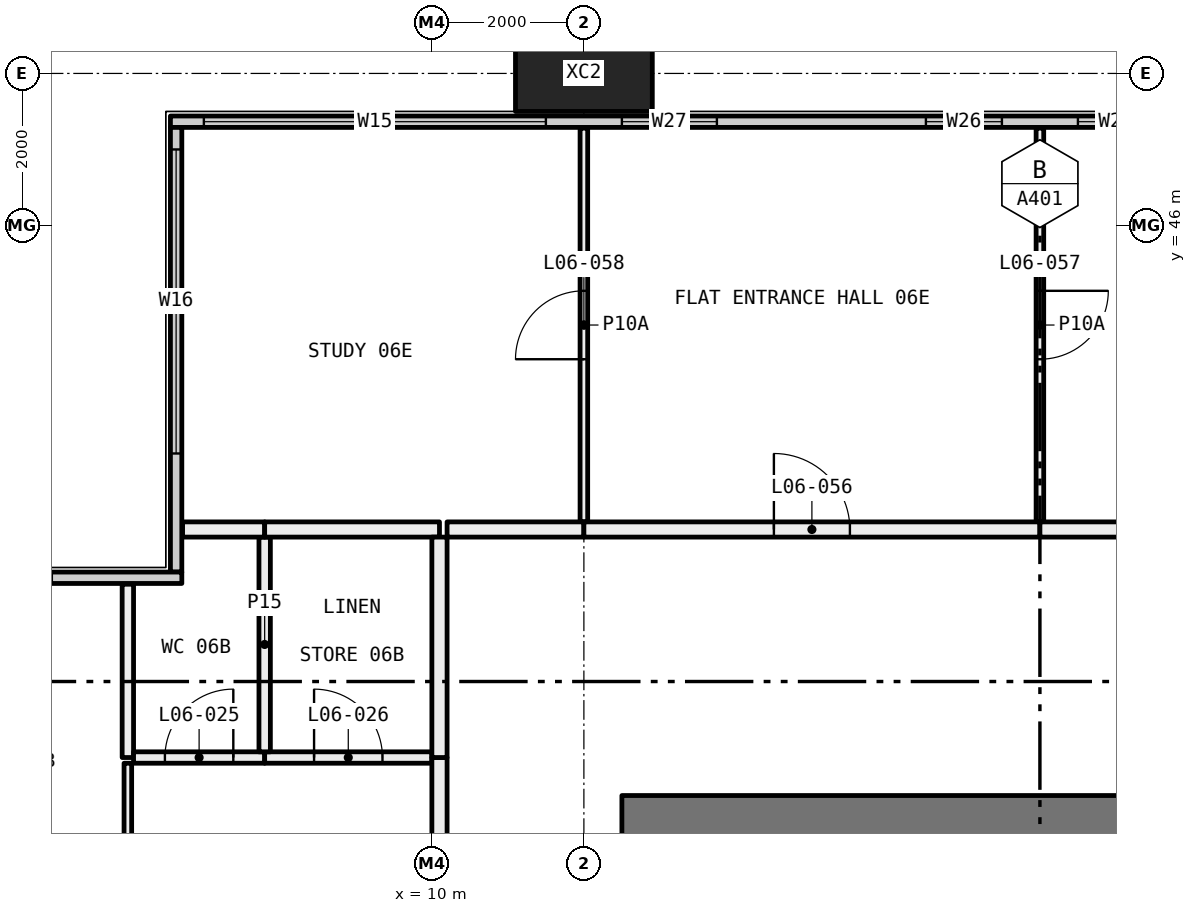
"""IFC4 building model, lengths in metres.
Left out: names, types, materials, properties, quantities, classifications, styles, units other than length and angle.
Written with IfcOpenShell. Run it as: python <this file> out.ifc"""

import sys

from ifc_helpers import new_model, si_unit, direction, frame, frame_2d, origin, origin_2d, place, context, subcontext, project, spatial, rectangle, hollow_rectangle, extrude, element, fill, save


model = new_model("IFC4")
c1 = context("Model", 3, precision=1e-05, world=origin(), true_north=direction((0.0, 1.0)))
c2 = subcontext(c1, "Body", "Model", "MODEL_VIEW")
j1 = project(units=[si_unit("LENGTHUNIT", "METRE"), si_unit("PLANEANGLEUNIT", "RADIAN")], contexts=[c1])
p1 = place(None, origin())
s1 = spatial("IfcSite", under=j1, at=p1, CompositionType="ELEMENT")
p2 = place(p1, origin())
s2 = spatial("IfcBuilding", under=s1, at=p2, CompositionType="ELEMENT")
p3 = place(p2, frame((0.0, 0.0, 33.45)))
s3 = spatial("IfcBuildingStorey", under=s2, at=p3, CompositionType="ELEMENT", Elevation=33.45)
p4 = place(p3, frame((12.0, 48.0, -0.4), z_axis=(0.0, 0.0, 1.0), x_axis=(1.0, 0.0, 0.0)))
e1 = element("IfcColumn", 1, at=p4, inside=s3, PredefinedType="COLUMN", context=c2, shape_type="SweptSolid", body=[
    extrude(hollow_rectangle(XDim=1.8, YDim=1.0, WallThickness=0.07, at=origin_2d()), origin(), (0.0, 0.0, 1.0), 3.45),
])
p5 = place(p3, frame((6.56, 47.365, 0.0), z_axis=(0.0, 0.0, 1.0), x_axis=(1.0, 0.0, 0.0)))
e2 = element("IfcWall", 2, at=p5, inside=s3, PredefinedType="ELEMENTEDWALL", context=c2, shape_type="SweptSolid", body=[
    extrude(rectangle(XDim=58.88, YDim=0.15, at=frame_2d((29.44, 0.0))), origin(), (0.0, 0.0, 1.0), 3.05),
])
p6 = place(p5, frame((0.44, 0.0, 0.45)))
e3 = element("IfcOpeningElement", 3, at=p6, cuts=e2, PredefinedType="OPENING", context=c2, shape_type="SweptSolid", body=[
    extrude(rectangle(XDim=4.5, YDim=2.55, at=frame_2d((2.25, 1.275))), frame((0.0, 0.085, 0.0), z_axis=(0.0, -1.0, 0.0), x_axis=(1.0, 0.0, 0.0)), (0.0, 0.0, 1.0), 0.17),
])
p7 = place(p5, frame((5.94, 0.0, 0.45)))
e4 = element("IfcOpeningElement", 4, at=p7, cuts=e2, PredefinedType="OPENING", context=c2, shape_type="SweptSolid", body=[
    extrude(rectangle(XDim=1.25, YDim=2.55, at=frame_2d((0.625, 1.275))), frame((0.0, 0.085, 0.0), z_axis=(0.0, -1.0, 0.0), x_axis=(1.0, 0.0, 0.0)), (0.0, 0.0, 1.0), 0.17),
])
p8 = place(p5, frame((9.94, 0.0, 0.45)))
e5 = element("IfcOpeningElement", 5, at=p8, cuts=e2, PredefinedType="OPENING", context=c2, shape_type="SweptSolid", body=[
    extrude(rectangle(XDim=1.0, YDim=2.55, at=frame_2d((0.5, 1.275))), frame((0.0, 0.085, 0.0), z_axis=(0.0, -1.0, 0.0), x_axis=(1.0, 0.0, 0.0)), (0.0, 0.0, 1.0), 0.17),
])
p9 = place(p5, frame((11.94, 0.0, 0.45)))
e6 = element("IfcOpeningElement", 6, at=p9, cuts=e2, PredefinedType="OPENING", context=c2, shape_type="SweptSolid", body=[
    extrude(rectangle(XDim=1.0, YDim=2.55, at=frame_2d((0.5, 1.275))), frame((0.0, 0.085, 0.0), z_axis=(0.0, -1.0, 0.0), x_axis=(1.0, 0.0, 0.0)), (0.0, 0.0, 1.0), 0.17),
])
p10 = place(p5, frame((15.69, 0.0, 0.45)))
e7 = element("IfcOpeningElement", 7, at=p10, cuts=e2, PredefinedType="OPENING", context=c2, shape_type="SweptSolid", body=[
    extrude(rectangle(XDim=1.25, YDim=2.55, at=frame_2d((0.625, 1.275))), frame((0.0, 0.085, 0.0), z_axis=(0.0, -1.0, 0.0), x_axis=(1.0, 0.0, 0.0)), (0.0, 0.0, 1.0), 0.17),
])
p11 = place(p5, frame((17.94, 0.0, 0.45)))
e8 = element("IfcOpeningElement", 8, at=p11, cuts=e2, PredefinedType="OPENING", context=c2, shape_type="SweptSolid", body=[
    extrude(rectangle(XDim=1.25, YDim=2.55, at=frame_2d((0.625, 1.275))), frame((0.0, 0.085, 0.0), z_axis=(0.0, -1.0, 0.0), x_axis=(1.0, 0.0, 0.0)), (0.0, 0.0, 1.0), 0.17),
])
p12 = place(p5, frame((21.94, 0.0, 0.45)))
e9 = element("IfcOpeningElement", 9, at=p12, cuts=e2, PredefinedType="OPENING", context=c2, shape_type="SweptSolid", body=[
    extrude(rectangle(XDim=1.0, YDim=2.55, at=frame_2d((0.5, 1.275))), frame((0.0, 0.085, 0.0), z_axis=(0.0, -1.0, 0.0), x_axis=(1.0, 0.0, 0.0)), (0.0, 0.0, 1.0), 0.17),
])
p13 = place(p5, frame((23.94, 0.0, 0.45)))
e10 = element("IfcOpeningElement", 10, at=p13, cuts=e2, PredefinedType="OPENING", context=c2, shape_type="SweptSolid", body=[
    extrude(rectangle(XDim=1.0, YDim=2.55, at=frame_2d((0.5, 1.275))), frame((0.0, 0.085, 0.0), z_axis=(0.0, -1.0, 0.0), x_axis=(1.0, 0.0, 0.0)), (0.0, 0.0, 1.0), 0.17),
])
p14 = place(p5, frame((27.69, 0.0, 0.45)))
e11 = element("IfcOpeningElement", 11, at=p14, cuts=e2, PredefinedType="OPENING", context=c2, shape_type="SweptSolid", body=[
    extrude(rectangle(XDim=1.25, YDim=2.55, at=frame_2d((0.625, 1.275))), frame((0.0, 0.085, 0.0), z_axis=(0.0, -1.0, 0.0), x_axis=(1.0, 0.0, 0.0)), (0.0, 0.0, 1.0), 0.17),
])
p15 = place(p5, frame((29.94, 0.0, 0.45)))
e12 = element("IfcOpeningElement", 12, at=p15, cuts=e2, PredefinedType="OPENING", context=c2, shape_type="SweptSolid", body=[
    extrude(rectangle(XDim=1.25, YDim=2.55, at=frame_2d((0.625, 1.275))), frame((0.0, 0.085, 0.0), z_axis=(0.0, -1.0, 0.0), x_axis=(1.0, 0.0, 0.0)), (0.0, 0.0, 1.0), 0.17),
])
p16 = place(p5, frame((33.94, 0.0, 0.45)))
e13 = element("IfcOpeningElement", 13, at=p16, cuts=e2, PredefinedType="OPENING", context=c2, shape_type="SweptSolid", body=[
    extrude(rectangle(XDim=1.0, YDim=2.55, at=frame_2d((0.5, 1.275))), frame((0.0, 0.085, 0.0), z_axis=(0.0, -1.0, 0.0), x_axis=(1.0, 0.0, 0.0)), (0.0, 0.0, 1.0), 0.17),
])
p17 = place(p5, frame((35.94, 0.0, 0.45)))
e14 = element("IfcOpeningElement", 14, at=p17, cuts=e2, PredefinedType="OPENING", context=c2, shape_type="SweptSolid", body=[
    extrude(rectangle(XDim=1.0, YDim=2.55, at=frame_2d((0.5, 1.275))), frame((0.0, 0.085, 0.0), z_axis=(0.0, -1.0, 0.0), x_axis=(1.0, 0.0, 0.0)), (0.0, 0.0, 1.0), 0.17),
])
p18 = place(p5, frame((39.69, 0.0, 0.45)))
e15 = element("IfcOpeningElement", 15, at=p18, cuts=e2, PredefinedType="OPENING", context=c2, shape_type="SweptSolid", body=[
    extrude(rectangle(XDim=1.25, YDim=2.55, at=frame_2d((0.625, 1.275))), frame((0.0, 0.085, 0.0), z_axis=(0.0, -1.0, 0.0), x_axis=(1.0, 0.0, 0.0)), (0.0, 0.0, 1.0), 0.17),
])
p19 = place(p5, frame((41.94, 0.0, 0.45)))
e16 = element("IfcOpeningElement", 16, at=p19, cuts=e2, PredefinedType="OPENING", context=c2, shape_type="SweptSolid", body=[
    extrude(rectangle(XDim=1.25, YDim=2.55, at=frame_2d((0.625, 1.275))), frame((0.0, 0.085, 0.0), z_axis=(0.0, -1.0, 0.0), x_axis=(1.0, 0.0, 0.0)), (0.0, 0.0, 1.0), 0.17),
])
p20 = place(p5, frame((45.94, 0.0, 0.45)))
e17 = element("IfcOpeningElement", 17, at=p20, cuts=e2, PredefinedType="OPENING", context=c2, shape_type="SweptSolid", body=[
    extrude(rectangle(XDim=1.0, YDim=2.55, at=frame_2d((0.5, 1.275))), frame((0.0, 0.085, 0.0), z_axis=(0.0, -1.0, 0.0), x_axis=(1.0, 0.0, 0.0)), (0.0, 0.0, 1.0), 0.17),
])
p21 = place(p5, frame((47.94, 0.0, 0.45)))
e18 = element("IfcOpeningElement", 18, at=p21, cuts=e2, PredefinedType="OPENING", context=c2, shape_type="SweptSolid", body=[
    extrude(rectangle(XDim=1.0, YDim=2.55, at=frame_2d((0.5, 1.275))), frame((0.0, 0.085, 0.0), z_axis=(0.0, -1.0, 0.0), x_axis=(1.0, 0.0, 0.0)), (0.0, 0.0, 1.0), 0.17),
])
p22 = place(p5, frame((51.69, 0.0, 0.45)))
e19 = element("IfcOpeningElement", 19, at=p22, cuts=e2, PredefinedType="OPENING", context=c2, shape_type="SweptSolid", body=[
    extrude(rectangle(XDim=1.25, YDim=2.55, at=frame_2d((0.625, 1.275))), frame((0.0, 0.085, 0.0), z_axis=(0.0, -1.0, 0.0), x_axis=(1.0, 0.0, 0.0)), (0.0, 0.0, 1.0), 0.17),
])
p23 = place(p5, frame((53.94, 0.0, 0.45)))
e20 = element("IfcOpeningElement", 20, at=p23, cuts=e2, PredefinedType="OPENING", context=c2, shape_type="SweptSolid", body=[
    extrude(rectangle(XDim=4.5, YDim=2.55, at=frame_2d((2.25, 1.275))), frame((0.0, 0.085, 0.0), z_axis=(0.0, -1.0, 0.0), x_axis=(1.0, 0.0, 0.0)), (0.0, 0.0, 1.0), 0.17),
])
p24 = place(p3, frame((6.635, 41.44, 0.0), z_axis=(0.0, 0.0, 1.0), x_axis=(0.0, 1.0, 0.0)))
e21 = element("IfcWall", 21, at=p24, inside=s3, PredefinedType="ELEMENTEDWALL", context=c2, shape_type="SweptSolid", body=[
    extrude(rectangle(XDim=5.85, YDim=0.15, at=frame_2d((2.925, 0.0))), origin(), (0.0, 0.0, 1.0), 3.05),
])
p25 = place(p24, frame((1.56, 0.0, 0.45)))
e22 = element("IfcOpeningElement", 22, at=p25, cuts=e21, PredefinedType="OPENING", context=c2, shape_type="SweptSolid", body=[
    extrude(rectangle(XDim=4.0, YDim=2.55, at=frame_2d((2.0, 1.275))), frame((0.0, 0.085, 0.0), z_axis=(0.0, -1.0, 0.0), x_axis=(1.0, 0.0, 0.0)), (0.0, 0.0, 1.0), 0.17),
])
p26 = place(p3, frame((0.56, 41.365, 0.0), z_axis=(0.0, 0.0, 1.0), x_axis=(1.0, 0.0, 0.0)))
e23 = element("IfcWall", 23, at=p26, inside=s3, PredefinedType="ELEMENTEDWALL", context=c2, shape_type="SweptSolid", body=[
    extrude(rectangle(XDim=6.15, YDim=0.15, at=frame_2d((3.075, 0.0))), origin(), (0.0, 0.0, 1.0), 3.05),
])
p27 = place(p26, frame((0.44, 0.0, 0.45)))
e24 = element("IfcOpeningElement", 24, at=p27, cuts=e23, PredefinedType="OPENING", context=c2, shape_type="SweptSolid", body=[
    extrude(rectangle(XDim=4.0, YDim=2.55, at=frame_2d((2.0, 1.275))), frame((0.0, 0.085, 0.0), z_axis=(0.0, -1.0, 0.0), x_axis=(1.0, 0.0, 0.0)), (0.0, 0.0, 1.0), 0.17),
])
p28 = place(p3, frame((6.0, 36.05, 0.0), z_axis=(0.0, 0.0, 1.0), x_axis=(0.0, 1.0, 0.0)))
e25 = element("IfcWall", 25, at=p28, inside=s3, PredefinedType="PARTITIONING", context=c2, shape_type="SweptSolid", body=[
    extrude(rectangle(XDim=2.875, YDim=0.1, at=frame_2d((1.438, 0.0))), origin(), (0.0, 0.0, 1.0), 2.45),
])
p29 = place(p3, frame((6.0, 39.0, 0.0), z_axis=(0.0, 0.0, 1.0), x_axis=(0.0, 1.0, 0.0)))
e26 = element("IfcWall", 26, at=p29, inside=s3, PredefinedType="PARTITIONING", context=c2, shape_type="SweptSolid", body=[
    extrude(rectangle(XDim=2.28, YDim=0.15, at=frame_2d((1.14, 0.0))), origin(), (0.0, 0.0, 1.0), 3.05),
])
p30 = place(p3, frame((7.8, 39.0, 0.0), z_axis=(0.0, 0.0, 1.0), x_axis=(-1.0, 0.0, 0.0)))
e27 = element("IfcWall", 27, at=p30, inside=s3, PredefinedType="PARTITIONING", context=c2, shape_type="SweptSolid", body=[
    extrude(rectangle(XDim=1.725, YDim=0.15, at=frame_2d((0.863, 0.0))), origin(), (0.0, 0.0, 1.0), 3.05),
])
p31 = place(p30, frame((0.413, 0.0, 0.0)))
e28 = element("IfcOpeningElement", 28, at=p31, cuts=e27, PredefinedType="OPENING", context=c2, shape_type="SweptSolid", body=[
    extrude(rectangle(XDim=0.9, YDim=2.1, at=frame_2d((0.45, 1.05))), frame((0.0, 0.085, 0.0), z_axis=(0.0, -1.0, 0.0), x_axis=(1.0, 0.0, 0.0)), (0.0, 0.0, 1.0), 0.17),
])
p32 = place(p3, frame((10.0, 39.0, 0.0), z_axis=(0.0, 0.0, 1.0), x_axis=(-1.0, 0.0, 0.0)))
e29 = element("IfcWall", 29, at=p32, inside=s3, PredefinedType="PARTITIONING", context=c2, shape_type="SweptSolid", body=[
    extrude(rectangle(XDim=2.2, YDim=0.15, at=frame_2d((1.1, 0.0))), origin(), (0.0, 0.0, 1.0), 3.05),
])
p33 = place(p32, frame((0.65, 0.0, 0.0)))
e30 = element("IfcOpeningElement", 30, at=p33, cuts=e29, PredefinedType="OPENING", context=c2, shape_type="SweptSolid", body=[
    extrude(rectangle(XDim=0.9, YDim=2.1, at=frame_2d((0.45, 1.05))), frame((0.0, 0.085, 0.0), z_axis=(0.0, -1.0, 0.0), x_axis=(1.0, 0.0, 0.0)), (0.0, 0.0, 1.0), 0.17),
])
p34 = place(p3, frame((10.1, 36.1, 0.0), z_axis=(0.0, 0.0, 1.0), x_axis=(0.0, 1.0, 0.0)))
e31 = element("IfcWall", 31, at=p34, inside=s3, PredefinedType="PARTITIONING", context=c2, shape_type="SweptSolid", body=[
    extrude(rectangle(XDim=2.9, YDim=0.2, at=frame_2d((1.45, 0.0))), origin(), (0.0, 0.0, 1.0), 3.05),
])
p35 = place(p3, frame((7.8, 39.075, 0.0), z_axis=(0.0, 0.0, 1.0), x_axis=(0.0, 1.0, 0.0)))
e32 = element("IfcWall", 32, at=p35, inside=s3, PredefinedType="PARTITIONING", context=c2, shape_type="SweptSolid", body=[
    extrude(rectangle(XDim=2.825, YDim=0.15, at=frame_2d((1.413, 0.0))), origin(), (0.0, 0.0, 1.0), 3.05),
])
p36 = place(p3, frame((7.8, 42.0, 0.0), z_axis=(0.0, 0.0, 1.0), x_axis=(-1.0, 0.0, 0.0)))
e33 = element("IfcWall", 33, at=p36, inside=s3, PredefinedType="PARTITIONING", context=c2, shape_type="SweptSolid", body=[
    extrude(rectangle(XDim=1.08, YDim=0.2, at=frame_2d((0.54, 0.0))), origin(), (0.0, 0.0, 1.0), 3.05),
])
p37 = place(p3, frame((10.1, 42.0, 0.0), z_axis=(0.0, 0.0, 1.0), x_axis=(-1.0, 0.0, 0.0)))
e34 = element("IfcWall", 34, at=p37, inside=s3, PredefinedType="PARTITIONING", context=c2, shape_type="SweptSolid", body=[
    extrude(rectangle(XDim=2.3, YDim=0.2, at=frame_2d((1.15, 0.0))), origin(), (0.0, 0.0, 1.0), 3.05),
])
p38 = place(p3, frame((10.1, 39.0, 0.0), z_axis=(0.0, 0.0, 1.0), x_axis=(0.0, 1.0, 0.0)))
e35 = element("IfcWall", 35, at=p38, inside=s3, PredefinedType="PARTITIONING", context=c2, shape_type="SweptSolid", body=[
    extrude(rectangle(XDim=2.9, YDim=0.2, at=frame_2d((1.45, 0.0))), origin(), (0.0, 0.0, 1.0), 3.05),
])
p39 = place(p3, frame((12.0, 42.1, 0.0), z_axis=(0.0, 0.0, 1.0), x_axis=(0.0, 1.0, 0.0)))
e36 = element("IfcWall", 36, at=p39, inside=s3, PredefinedType="PARTITIONING", context=c2, shape_type="SweptSolid", body=[
    extrude(rectangle(XDim=5.18, YDim=0.1, at=frame_2d((2.59, 0.0))), origin(), (0.0, 0.0, 1.0), 3.05),
])
p40 = place(p39, frame((2.14, 0.0, 0.0)))
e37 = element("IfcOpeningElement", 37, at=p40, cuts=e36, PredefinedType="OPENING", context=c2, shape_type="SweptSolid", body=[
    extrude(rectangle(XDim=0.9, YDim=2.1, at=frame_2d((0.45, 1.05))), frame((0.0, 0.06, 0.0), z_axis=(0.0, -1.0, 0.0), x_axis=(1.0, 0.0, 0.0)), (0.0, 0.0, 1.0), 0.12),
])
p41 = place(p3, frame((10.2, 42.0, 0.0), z_axis=(0.0, 0.0, 1.0), x_axis=(1.0, 0.0, 0.0)))
e38 = element("IfcWall", 38, at=p41, inside=s3, PredefinedType="PARTITIONING", context=c2, shape_type="SweptSolid", body=[
    extrude(rectangle(XDim=1.8, YDim=0.2, at=frame_2d((0.9, 0.0))), origin(), (0.0, 0.0, 1.0), 3.05),
])
p42 = place(p3, frame((18.0, 42.1, 0.0), z_axis=(0.0, 0.0, 1.0), x_axis=(0.0, 1.0, 0.0)))
e39 = element("IfcWall", 39, at=p42, inside=s3, PredefinedType="PARTITIONING", context=c2, shape_type="SweptSolid", body=[
    extrude(rectangle(XDim=5.18, YDim=0.1, at=frame_2d((2.59, 0.0))), origin(), (0.0, 0.0, 1.0), 3.05),
])
p43 = place(p42, frame((2.14, 0.0, 0.0)))
e40 = element("IfcOpeningElement", 40, at=p43, cuts=e39, PredefinedType="OPENING", context=c2, shape_type="SweptSolid", body=[
    extrude(rectangle(XDim=0.9, YDim=2.1, at=frame_2d((0.45, 1.05))), frame((0.0, 0.06, 0.0), z_axis=(0.0, -1.0, 0.0), x_axis=(1.0, 0.0, 0.0)), (0.0, 0.0, 1.0), 0.12),
])
p44 = place(p3, frame((12.0, 42.0, 0.0), z_axis=(0.0, 0.0, 1.0), x_axis=(1.0, 0.0, 0.0)))
e41 = element("IfcWall", 41, at=p44, inside=s3, PredefinedType="PARTITIONING", context=c2, shape_type="SweptSolid", body=[
    extrude(rectangle(XDim=6.0, YDim=0.2, at=frame_2d((3.0, 0.0))), origin(), (0.0, 0.0, 1.0), 3.05),
])
p45 = place(p44, frame((2.5, 0.0, 0.0)))
e42 = element("IfcOpeningElement", 42, at=p45, cuts=e41, PredefinedType="OPENING", context=c2, shape_type="SweptSolid", body=[
    extrude(rectangle(XDim=1.0, YDim=2.1, at=frame_2d((0.5, 1.05))), frame((0.0, 0.11, 0.0), z_axis=(0.0, -1.0, 0.0), x_axis=(1.0, 0.0, 0.0)), (0.0, 0.0, 1.0), 0.22),
])
p46 = place(p3, frame((18.0, 42.0, 0.0), z_axis=(0.0, 0.0, 1.0), x_axis=(1.0, 0.0, 0.0)))
e43 = element("IfcWall", 43, at=p46, inside=s3, PredefinedType="PARTITIONING", context=c2, shape_type="SweptSolid", body=[
    extrude(rectangle(XDim=6.0, YDim=0.2, at=frame_2d((3.0, 0.0))), origin(), (0.0, 0.0, 1.0), 3.05),
])
p47 = place(p3, frame((12.5, 38.1, 0.0), z_axis=(0.0, 0.0, 1.0), x_axis=(1.0, 0.0, 0.0)))
e44 = element("IfcWall", 44, at=p47, inside=s3, PredefinedType="SHEAR", context=c2, shape_type="SweptSolid", body=[
    extrude(rectangle(XDim=11.0, YDim=0.8, at=frame_2d((5.5, 0.0))), origin(), (0.0, 0.0, 1.0), 3.05),
])
p48 = place(p47, frame((8.4, 0.0, 0.0)))
e45 = element("IfcOpeningElement", 45, at=p48, cuts=e44, PredefinedType="OPENING", context=c2, shape_type="SweptSolid", body=[
    extrude(rectangle(XDim=1.6, YDim=2.1, at=frame_2d((0.8, 1.05))), frame((0.0, 0.41, 0.0), z_axis=(0.0, -1.0, 0.0), x_axis=(1.0, 0.0, 0.0)), (0.0, 0.0, 1.0), 0.82),
])
p49 = place(p6, origin())
e46 = element("IfcWindow", 46, at=p49, inside=s3, PartitioningType="SINGLE_PANEL", PredefinedType="WINDOW", context=c2, shape_type="SweptSolid", body=[
    extrude(rectangle(XDim=4.5, YDim=2.55, at=frame_2d((2.25, 1.275))), frame((0.0, 0.03, 0.0), z_axis=(0.0, -1.0, 0.0), x_axis=(1.0, 0.0, 0.0)), (0.0, 0.0, 1.0), 0.06),
])
fill(e3, e46)
p50 = place(p7, origin())
e47 = element("IfcWindow", 47, at=p50, inside=s3, PartitioningType="SINGLE_PANEL", PredefinedType="WINDOW", context=c2, shape_type="SweptSolid", body=[
    extrude(rectangle(XDim=1.25, YDim=2.55, at=frame_2d((0.625, 1.275))), frame((0.0, 0.03, 0.0), z_axis=(0.0, -1.0, 0.0), x_axis=(1.0, 0.0, 0.0)), (0.0, 0.0, 1.0), 0.06),
])
fill(e4, e47)
p51 = place(p8, origin())
e48 = element("IfcWindow", 48, at=p51, inside=s3, PartitioningType="SINGLE_PANEL", PredefinedType="WINDOW", context=c2, shape_type="SweptSolid", body=[
    extrude(rectangle(XDim=1.0, YDim=2.55, at=frame_2d((0.5, 1.275))), frame((0.0, 0.03, 0.0), z_axis=(0.0, -1.0, 0.0), x_axis=(1.0, 0.0, 0.0)), (0.0, 0.0, 1.0), 0.06),
])
fill(e5, e48)
p52 = place(p9, origin())
e49 = element("IfcWindow", 49, at=p52, inside=s3, PartitioningType="SINGLE_PANEL", PredefinedType="WINDOW", context=c2, shape_type="SweptSolid", body=[
    extrude(rectangle(XDim=1.0, YDim=2.55, at=frame_2d((0.5, 1.275))), frame((0.0, 0.03, 0.0), z_axis=(0.0, -1.0, 0.0), x_axis=(1.0, 0.0, 0.0)), (0.0, 0.0, 1.0), 0.06),
])
fill(e6, e49)
p53 = place(p25, origin())
e50 = element("IfcWindow", 50, at=p53, inside=s3, PartitioningType="SINGLE_PANEL", PredefinedType="WINDOW", context=c2, shape_type="SweptSolid", body=[
    extrude(rectangle(XDim=4.0, YDim=2.55, at=frame_2d((2.0, 1.275))), frame((0.0, 0.03, 0.0), z_axis=(0.0, -1.0, 0.0), x_axis=(1.0, 0.0, 0.0)), (0.0, 0.0, 1.0), 0.06),
])
fill(e22, e50)
p54 = place(p31, frame((0.9, 0.0, 0.0), x_axis=(-1.0, 0.0, 0.0)))
e51 = element("IfcDoor", 51, at=p54, inside=s3, OperationType="SINGLE_SWING_LEFT", PredefinedType="DOOR", context=c2, shape_type="SweptSolid", body=[
    extrude(rectangle(XDim=0.9, YDim=2.1, at=frame_2d((0.45, 1.05))), frame((0.0, 0.025, 0.0), z_axis=(0.0, -1.0, 0.0), x_axis=(1.0, 0.0, 0.0)), (0.0, 0.0, 1.0), 0.05),
])
fill(e28, e51)
p55 = place(p33, frame((0.9, 0.0, 0.0), x_axis=(-1.0, 0.0, 0.0)))
e52 = element("IfcDoor", 52, at=p55, inside=s3, OperationType="SINGLE_SWING_RIGHT", PredefinedType="DOOR", context=c2, shape_type="SweptSolid", body=[
    extrude(rectangle(XDim=0.9, YDim=2.1, at=frame_2d((0.45, 1.05))), frame((0.0, 0.025, 0.0), z_axis=(0.0, -1.0, 0.0), x_axis=(1.0, 0.0, 0.0)), (0.0, 0.0, 1.0), 0.05),
])
fill(e30, e52)
p56 = place(p45, origin())
e53 = element("IfcDoor", 53, at=p56, inside=s3, OperationType="SINGLE_SWING_RIGHT", PredefinedType="DOOR", context=c2, shape_type="SweptSolid", body=[
    extrude(rectangle(XDim=1.0, YDim=2.1, at=frame_2d((0.5, 1.05))), frame((0.0, 0.025, 0.0), z_axis=(0.0, -1.0, 0.0), x_axis=(1.0, 0.0, 0.0)), (0.0, 0.0, 1.0), 0.05),
])
fill(e42, e53)
p57 = place(p43, frame((0.9, 0.0, 0.0), x_axis=(-1.0, 0.0, 0.0)))
e54 = element("IfcDoor", 54, at=p57, inside=s3, OperationType="SINGLE_SWING_RIGHT", PredefinedType="DOOR", context=c2, shape_type="SweptSolid", body=[
    extrude(rectangle(XDim=0.9, YDim=2.1, at=frame_2d((0.45, 1.05))), frame((0.0, 0.025, 0.0), z_axis=(0.0, -1.0, 0.0), x_axis=(1.0, 0.0, 0.0)), (0.0, 0.0, 1.0), 0.05),
])
fill(e40, e54)
p58 = place(p40, origin())
e55 = element("IfcDoor", 55, at=p58, inside=s3, OperationType="SINGLE_SWING_RIGHT", PredefinedType="DOOR", context=c2, shape_type="SweptSolid", body=[
    extrude(rectangle(XDim=0.9, YDim=2.1, at=frame_2d((0.45, 1.05))), frame((0.0, 0.025, 0.0), z_axis=(0.0, -1.0, 0.0), x_axis=(1.0, 0.0, 0.0)), (0.0, 0.0, 1.0), 0.05),
])
fill(e37, e55)
save(model, sys.argv[1])
